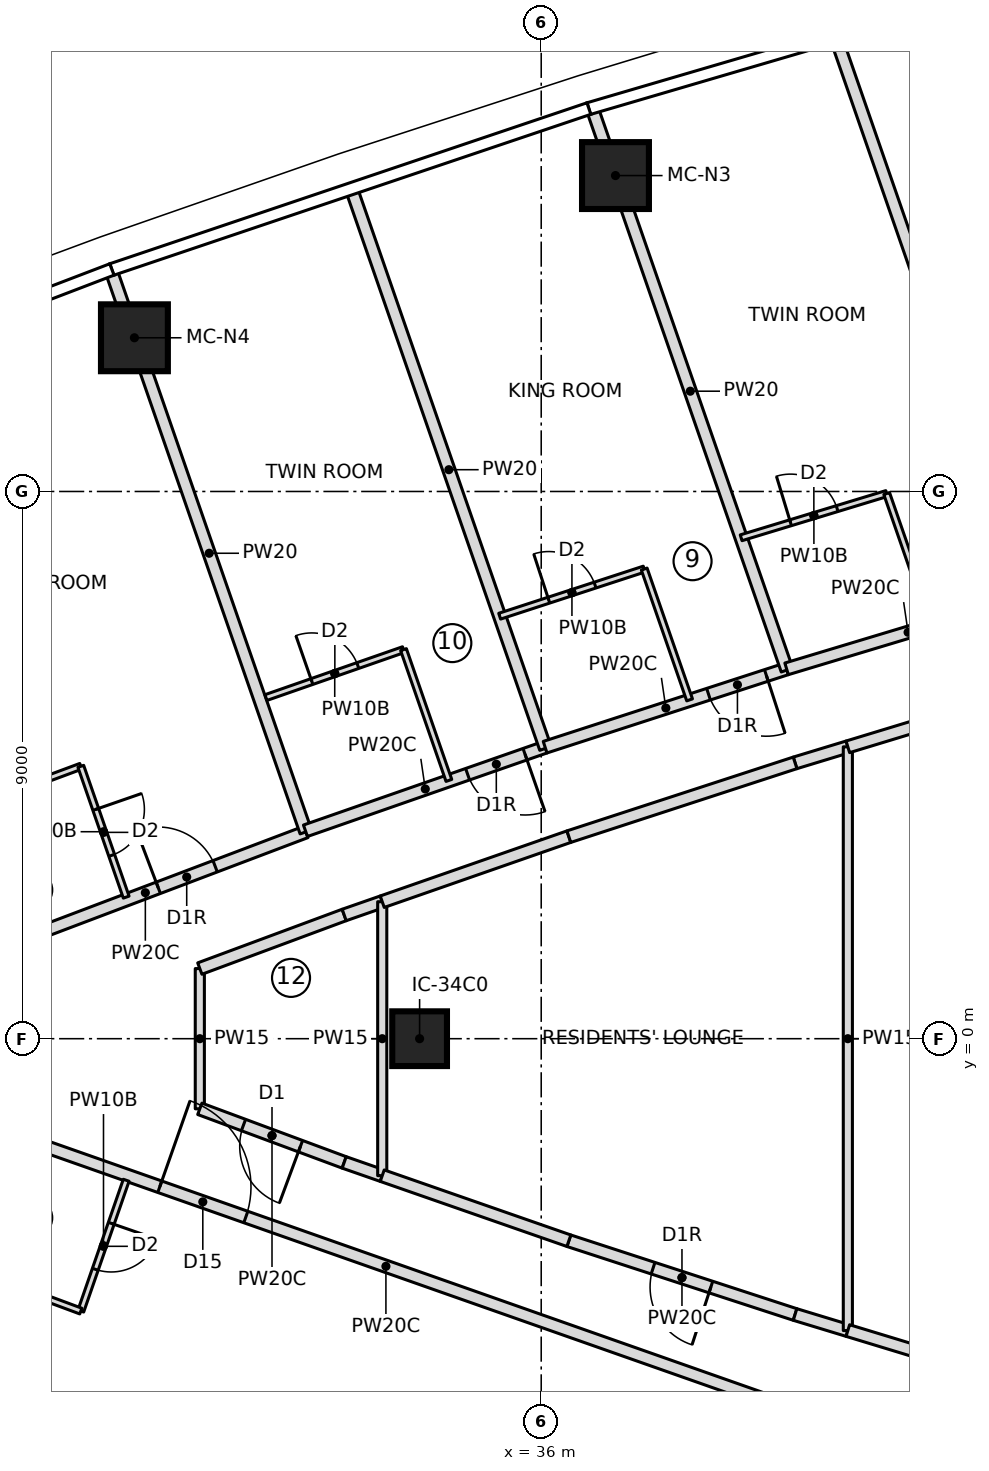
"""IFC4 building model, lengths in metres.
Left out: names, types, materials, properties, quantities, classifications, styles, units other than length and angle.
Written with IfcOpenShell. Run it as: python <this file> out.ifc"""

import sys

from ifc_helpers import new_model, si_unit, direction, frame, frame_2d, origin, origin_2d, place, context, subcontext, project, spatial, rectangle, extrude, element, fill, save


model = new_model("IFC4")
c1 = context("Model", 3, precision=1e-05, world=origin(), true_north=direction((0.0, 1.0)))
c2 = subcontext(c1, "Body", "Model", "MODEL_VIEW")
j1 = project(units=[si_unit("LENGTHUNIT", "METRE"), si_unit("PLANEANGLEUNIT", "RADIAN")], contexts=[c1])
p1 = place(None, origin())
s1 = spatial("IfcSite", under=j1, at=p1, CompositionType="ELEMENT")
p2 = place(p1, origin())
s2 = spatial("IfcBuilding", under=s1, at=p2, CompositionType="ELEMENT")
p3 = place(p2, frame((0.0, 0.0, 285.65)))
s3 = spatial("IfcBuildingStorey", under=s2, at=p3, CompositionType="ELEMENT", Elevation=285.65)
for number, where, z_axis, x_axis in (
    (1, (37.221, 14.196, 0.0), (0.0, 0.0, 1.0), (1.0, 0.0, 0.0)),
    (2, (29.31, 11.528, 0.0), (0.0, 0.0, 1.0), (1.0, 0.0, 0.0)),
):
    element("IfcColumn", number, at=place(p3, frame(where, z_axis=z_axis, x_axis=x_axis)), inside=s3, PredefinedType="COLUMN", context=c2, shape_type="SweptSolid", body=[
        extrude(rectangle(XDim=1.1, YDim=1.1, at=origin_2d()), origin(), (0.0, 0.0, 1.0), 3.55),
    ])
p4 = place(p3, frame((34.0, 0.0, 0.0), z_axis=(0.0, 0.0, 1.0), x_axis=(1.0, 0.0, 0.0)))
e3 = element("IfcColumn", 3, at=p4, inside=s3, PredefinedType="COLUMN", context=c2, shape_type="SweptSolid", body=[
    extrude(rectangle(XDim=0.9, YDim=0.9, at=origin_2d()), origin(), (0.0, 0.0, 1.0), 3.55),
])
p5 = place(p3, frame((26.85, 1.401, 0.0), z_axis=(0.0, 0.0, 1.0), x_axis=(0.935181367748, 0.354169181912, 0.0)))
e4 = element("IfcWall", 4, at=p5, inside=s3, PredefinedType="PARTITIONING", context=c2, shape_type="SweptSolid", body=[
    extrude(rectangle(XDim=5.645, YDim=0.2, at=frame_2d((2.823, 0.0))), origin(), (0.0, 0.0, 1.0), 3.25),
])
p6 = place(p5, frame((3.05, 0.0, 0.0)))
e5 = element("IfcOpeningElement", 5, at=p6, cuts=e4, PredefinedType="OPENING", context=c2, shape_type="SweptSolid", body=[
    extrude(rectangle(XDim=1.0, YDim=2.1, at=frame_2d((0.5, 1.05))), frame((0.0, 0.11, 0.0), z_axis=(0.0, -1.0, 0.0), x_axis=(1.0, 0.0, 0.0)), (0.0, 0.0, 1.0), 0.22),
])
p7 = place(p3, frame((27.733, 4.222, 0.0), z_axis=(0.0, 0.0, 1.0), x_axis=(0.937514267289, 0.347946833049, 0.0)))
e6 = element("IfcWall", 6, at=p7, inside=s3, PredefinedType="PARTITIONING", context=c2, shape_type="SweptSolid", body=[
    extrude(rectangle(XDim=0.742, YDim=0.1, at=frame_2d((0.371, 0.0))), origin(), (0.0, 0.0, 1.0), 3.25),
])
p8 = place(p3, frame((28.428, 4.48, 0.0), z_axis=(0.0, 0.0, 1.0), x_axis=(0.327718024288, -0.944775579996, 0.0)))
e7 = element("IfcWall", 7, at=p8, inside=s3, PredefinedType="PARTITIONING", context=c2, shape_type="SweptSolid", body=[
    extrude(rectangle(XDim=2.277, YDim=0.1, at=frame_2d((1.139, 0.0))), origin(), (0.0, 0.0, 1.0), 3.25),
])
p9 = place(p8, frame((0.75, 0.0, 0.0)))
e8 = element("IfcOpeningElement", 8, at=p9, cuts=e7, PredefinedType="OPENING", context=c2, shape_type="SweptSolid", body=[
    extrude(rectangle(XDim=0.8, YDim=2.1, at=frame_2d((0.4, 1.05))), frame((0.0, 0.06, 0.0), z_axis=(0.0, -1.0, 0.0), x_axis=(1.0, 0.0, 0.0)), (0.0, 0.0, 1.0), 0.12),
])
p10 = place(p3, frame((32.129, 3.401, 0.0), z_axis=(0.0, 0.0, 1.0), x_axis=(-0.327724115377, 0.944773467134, 0.0)))
e9 = element("IfcWall", 9, at=p10, inside=s3, PredefinedType="PARTITIONING", context=c2, shape_type="SweptSolid", body=[
    extrude(rectangle(XDim=9.702, YDim=0.2, at=frame_2d((4.851, 0.0))), origin(), (0.0, 0.0, 1.0), 3.25),
])
p11 = place(p3, frame((36.064, 4.794, 0.0), z_axis=(0.0, 0.0, 1.0), x_axis=(-0.944236129554, -0.329269086986, 0.0)))
e10 = element("IfcWall", 10, at=p11, inside=s3, PredefinedType="PARTITIONING", context=c2, shape_type="SweptSolid", body=[
    extrude(rectangle(XDim=4.174, YDim=0.2, at=frame_2d((2.087, 0.0))), origin(), (0.0, 0.0, 1.0), 3.25),
])
p12 = place(p11, frame((0.35, 0.0, 0.0)))
e11 = element("IfcOpeningElement", 11, at=p12, cuts=e10, PredefinedType="OPENING", context=c2, shape_type="SweptSolid", body=[
    extrude(rectangle(XDim=1.0, YDim=2.1, at=frame_2d((0.5, 1.05))), frame((0.0, 0.11, 0.0), z_axis=(0.0, -1.0, 0.0), x_axis=(1.0, 0.0, 0.0)), (0.0, 0.0, 1.0), 0.22),
])
p13 = place(p3, frame((31.473, 5.611, 0.0), z_axis=(0.0, 0.0, 1.0), x_axis=(0.944305532659, 0.329069994059, 0.0)))
e12 = element("IfcWall", 12, at=p13, inside=s3, PredefinedType="PARTITIONING", context=c2, shape_type="SweptSolid", body=[
    extrude(rectangle(XDim=2.396, YDim=0.1, at=frame_2d((1.198, 0.0))), origin(), (0.0, 0.0, 1.0), 3.25),
])
p14 = place(p13, frame((0.8, 0.0, 0.0)))
e13 = element("IfcOpeningElement", 13, at=p14, cuts=e12, PredefinedType="OPENING", context=c2, shape_type="SweptSolid", body=[
    extrude(rectangle(XDim=0.8, YDim=2.1, at=frame_2d((0.4, 1.05))), frame((0.0, 0.06, 0.0), z_axis=(0.0, -1.0, 0.0), x_axis=(1.0, 0.0, 0.0)), (0.0, 0.0, 1.0), 0.12),
])
p15 = place(p3, frame((33.735, 6.399, 0.0), z_axis=(0.0, 0.0, 1.0), x_axis=(0.32768871219, -0.944785747089, 0.0)))
e14 = element("IfcWall", 14, at=p15, inside=s3, PredefinedType="PARTITIONING", context=c2, shape_type="SweptSolid", body=[
    extrude(rectangle(XDim=2.277, YDim=0.1, at=frame_2d((1.138, 0.0))), origin(), (0.0, 0.0, 1.0), 3.25),
])
p16 = place(p3, frame((36.071, 4.775, 0.0), z_axis=(0.0, 0.0, 1.0), x_axis=(-0.327725028322, 0.94477315045, 0.0)))
e15 = element("IfcWall", 15, at=p16, inside=s3, PredefinedType="PARTITIONING", context=c2, shape_type="SweptSolid", body=[
    extrude(rectangle(XDim=9.702, YDim=0.2, at=frame_2d((4.851, 0.0))), origin(), (0.0, 0.0, 1.0), 3.25),
])
p17 = place(p3, frame((40.035, 6.083, 0.0), z_axis=(0.0, 0.0, 1.0), x_axis=(-0.951196378796, -0.308586209941, 0.0)))
e16 = element("IfcWall", 16, at=p17, inside=s3, PredefinedType="PARTITIONING", context=c2, shape_type="SweptSolid", body=[
    extrude(rectangle(XDim=4.175, YDim=0.2, at=frame_2d((2.087, 0.0))), origin(), (0.0, 0.0, 1.0), 3.25),
])
p18 = place(p17, frame((0.35, 0.0, 0.0)))
e17 = element("IfcOpeningElement", 17, at=p18, cuts=e16, PredefinedType="OPENING", context=c2, shape_type="SweptSolid", body=[
    extrude(rectangle(XDim=1.0, YDim=2.1, at=frame_2d((0.5, 1.05))), frame((0.0, 0.11, 0.0), z_axis=(0.0, -1.0, 0.0), x_axis=(1.0, 0.0, 0.0)), (0.0, 0.0, 1.0), 0.22),
])
p19 = place(p3, frame((35.317, 6.948, 0.0), z_axis=(0.0, 0.0, 1.0), x_axis=(0.950666002187, 0.310216299194, 0.0)))
e18 = element("IfcWall", 18, at=p19, inside=s3, PredefinedType="PARTITIONING", context=c2, shape_type="SweptSolid", body=[
    extrude(rectangle(XDim=2.5, YDim=0.1, at=frame_2d((1.25, 0.0))), origin(), (0.0, 0.0, 1.0), 3.25),
])
p20 = place(p19, frame((0.85, 0.0, 0.0)))
e19 = element("IfcOpeningElement", 19, at=p20, cuts=e18, PredefinedType="OPENING", context=c2, shape_type="SweptSolid", body=[
    extrude(rectangle(XDim=0.8, YDim=2.1, at=frame_2d((0.4, 1.05))), frame((0.0, 0.06, 0.0), z_axis=(0.0, -1.0, 0.0), x_axis=(1.0, 0.0, 0.0)), (0.0, 0.0, 1.0), 0.12),
])
p21 = place(p3, frame((37.694, 7.724, 0.0), z_axis=(0.0, 0.0, 1.0), x_axis=(0.327622330203, -0.944808768351, 0.0)))
e20 = element("IfcWall", 20, at=p21, inside=s3, PredefinedType="PARTITIONING", context=c2, shape_type="SweptSolid", body=[
    extrude(rectangle(XDim=2.277, YDim=0.1, at=frame_2d((1.139, 0.0))), origin(), (0.0, 0.0, 1.0), 3.25),
])
p22 = place(p3, frame((40.042, 6.064, 0.0), z_axis=(0.0, 0.0, 1.0), x_axis=(-0.327710853631, 0.944778067279, 0.0)))
e21 = element("IfcWall", 21, at=p22, inside=s3, PredefinedType="PARTITIONING", context=c2, shape_type="SweptSolid", body=[
    extrude(rectangle(XDim=9.707, YDim=0.2, at=frame_2d((4.854, 0.0))), origin(), (0.0, 0.0, 1.0), 3.25),
])
p23 = place(p3, frame((44.031, 7.286, 0.0), z_axis=(0.0, 0.0, 1.0), x_axis=(-0.957521424208, -0.288362137222, 0.0)))
e22 = element("IfcWall", 22, at=p23, inside=s3, PredefinedType="PARTITIONING", context=c2, shape_type="SweptSolid", body=[
    extrude(rectangle(XDim=4.173, YDim=0.2, at=frame_2d((2.086, 0.0))), origin(), (0.0, 0.0, 1.0), 3.25),
])
p24 = place(p23, frame((0.35, 0.0, 0.0)))
e23 = element("IfcOpeningElement", 23, at=p24, cuts=e22, PredefinedType="OPENING", context=c2, shape_type="SweptSolid", body=[
    extrude(rectangle(XDim=1.0, YDim=2.1, at=frame_2d((0.5, 1.05))), frame((0.0, 0.11, 0.0), z_axis=(0.0, -1.0, 0.0), x_axis=(1.0, 0.0, 0.0)), (0.0, 0.0, 1.0), 0.22),
])
p25 = place(p3, frame((39.288, 8.238, 0.0), z_axis=(0.0, 0.0, 1.0), x_axis=(0.956723503196, 0.290998519638, 0.0)))
e24 = element("IfcWall", 24, at=p25, inside=s3, PredefinedType="PARTITIONING", context=c2, shape_type="SweptSolid", body=[
    extrude(rectangle(XDim=2.502, YDim=0.1, at=frame_2d((1.251, 0.0))), origin(), (0.0, 0.0, 1.0), 3.25),
])
p26 = place(p25, frame((0.85, 0.0, 0.0)))
e25 = element("IfcOpeningElement", 25, at=p26, cuts=e24, PredefinedType="OPENING", context=c2, shape_type="SweptSolid", body=[
    extrude(rectangle(XDim=0.8, YDim=2.1, at=frame_2d((0.4, 1.05))), frame((0.0, 0.06, 0.0), z_axis=(0.0, -1.0, 0.0), x_axis=(1.0, 0.0, 0.0)), (0.0, 0.0, 1.0), 0.12),
])
p27 = place(p3, frame((41.681, 8.966, 0.0), z_axis=(0.0, 0.0, 1.0), x_axis=(0.327743427431, -0.944766767925, 0.0)))
e26 = element("IfcWall", 26, at=p27, inside=s3, PredefinedType="PARTITIONING", context=c2, shape_type="SweptSolid", body=[
    extrude(rectangle(XDim=2.279, YDim=0.1, at=frame_2d((1.139, 0.0))), origin(), (0.0, 0.0, 1.0), 3.25),
])
p28 = place(p3, frame((44.038, 7.267, 0.0), z_axis=(0.0, 0.0, 1.0), x_axis=(-0.327714576096, 0.944776776077, 0.0)))
e27 = element("IfcWall", 27, at=p28, inside=s3, PredefinedType="PARTITIONING", context=c2, shape_type="SweptSolid", body=[
    extrude(rectangle(XDim=9.717, YDim=0.2, at=frame_2d((4.858, 0.0))), origin(), (0.0, 0.0, 1.0), 3.25),
])
p29 = place(p3, frame((26.85, -1.423, 0.0), z_axis=(0.0, 0.0, 1.0), x_axis=(0.943328585164, -0.331860182022, 0.0)))
e28 = element("IfcWall", 28, at=p29, inside=s3, PredefinedType="PARTITIONING", context=c2, shape_type="SweptSolid", body=[
    extrude(rectangle(XDim=13.984, YDim=0.2, at=frame_2d((6.992, 0.0))), origin(), (0.0, 0.0, 1.0), 3.25),
])
p30 = place(p29, frame((3.05, 0.0, 0.0)))
e29 = element("IfcOpeningElement", 29, at=p30, cuts=e28, PredefinedType="OPENING", context=c2, shape_type="SweptSolid", body=[
    extrude(rectangle(XDim=1.5, YDim=2.1, at=frame_2d((0.75, 1.05))), frame((0.0, 0.11, 0.0), z_axis=(0.0, -1.0, 0.0), x_axis=(1.0, 0.0, 0.0)), (0.0, 0.0, 1.0), 0.22),
])
p31 = place(p3, frame((29.175, -2.328, 0.0), z_axis=(0.0, 0.0, 1.0), x_axis=(-0.327718024288, -0.944775579996, 0.0)))
e30 = element("IfcWall", 30, at=p31, inside=s3, PredefinedType="PARTITIONING", context=c2, shape_type="SweptSolid", body=[
    extrude(rectangle(XDim=2.277, YDim=0.1, at=frame_2d((1.139, 0.0))), origin(), (0.0, 0.0, 1.0), 3.25),
])
p32 = place(p31, frame((0.75, 0.0, 0.0)))
e31 = element("IfcOpeningElement", 31, at=p32, cuts=e30, PredefinedType="OPENING", context=c2, shape_type="SweptSolid", body=[
    extrude(rectangle(XDim=0.8, YDim=2.1, at=frame_2d((0.4, 1.05))), frame((0.0, 0.06, 0.0), z_axis=(0.0, -1.0, 0.0), x_axis=(1.0, 0.0, 0.0)), (0.0, 0.0, 1.0), 0.12),
])
p33 = place(p3, frame((28.428, -4.48, 0.0), z_axis=(0.0, 0.0, 1.0), x_axis=(-0.937514267289, 0.347946833049, 0.0)))
e32 = element("IfcWall", 32, at=p33, inside=s3, PredefinedType="PARTITIONING", context=c2, shape_type="SweptSolid", body=[
    extrude(rectangle(XDim=0.742, YDim=0.1, at=frame_2d((0.371, 0.0))), origin(), (0.0, 0.0, 1.0), 3.25),
])
p34 = place(p3, frame((30.385, -1.153, 0.0), z_axis=(0.0, 0.0, 1.0), x_axis=(0.0, 1.0, 0.0)))
e33 = element("IfcWall", 33, at=p34, inside=s3, PredefinedType="PARTITIONING", context=c2, shape_type="SweptSolid", body=[
    extrude(rectangle(XDim=2.307, YDim=0.15, at=frame_2d((1.153, 0.0))), origin(), (0.0, 0.0, 1.0), 3.25),
])
p35 = place(p3, frame((32.76, -2.035, 0.0), z_axis=(0.0, 0.0, 1.0), x_axis=(-0.937461225735, 0.348089715797, 0.0)))
e34 = element("IfcWall", 34, at=p35, inside=s3, PredefinedType="PARTITIONING", context=c2, shape_type="SweptSolid", body=[
    extrude(rectangle(XDim=2.533, YDim=0.2, at=frame_2d((1.266, 0.0))), origin(), (0.0, 0.0, 1.0), 3.25),
])
p36 = place(p35, frame((0.766, 0.0, 0.0)))
e35 = element("IfcOpeningElement", 35, at=p36, cuts=e34, PredefinedType="OPENING", context=c2, shape_type="SweptSolid", body=[
    extrude(rectangle(XDim=1.0, YDim=2.1, at=frame_2d((0.5, 1.05))), frame((0.0, 0.11, 0.0), z_axis=(0.0, -1.0, 0.0), x_axis=(1.0, 0.0, 0.0)), (0.0, 0.0, 1.0), 0.22),
])
p37 = place(p3, frame((30.385, 1.153, 0.0), z_axis=(0.0, 0.0, 1.0), x_axis=(0.937461225735, 0.348089715797, 0.0)))
e36 = element("IfcWall", 36, at=p37, inside=s3, PredefinedType="PARTITIONING", context=c2, shape_type="SweptSolid", body=[
    extrude(rectangle(XDim=2.533, YDim=0.2, at=frame_2d((1.266, 0.0))), origin(), (0.0, 0.0, 1.0), 3.25),
])
for number, where, z_axis, x_axis in (
    (37, (32.76, 2.035, 0.0), (0.0, 0.0, 1.0), (0.944, 0.329, 0.0)),
    (38, (33.385, -2.253, 0.0), (0.0, 0.0, 1.0), (-0.944, 0.329, 0.0)),
):
    element("IfcWall", number, at=place(p3, frame(where, z_axis=z_axis, x_axis=x_axis)), inside=s3, PredefinedType="PARTITIONING", context=c2, shape_type="SweptSolid", body=[
        extrude(rectangle(XDim=0.663, YDim=0.2, at=frame_2d((0.331, 0.0))), origin(), (0.0, 0.0, 1.0), 3.25),
    ])
p38 = place(p3, frame((33.385, -2.253, 0.0), z_axis=(0.0, 0.0, 1.0), x_axis=(0.0, 1.0, 0.0)))
e39 = element("IfcWall", 39, at=p38, inside=s3, PredefinedType="PARTITIONING", context=c2, shape_type="SweptSolid", body=[
    extrude(rectangle(XDim=4.506, YDim=0.15, at=frame_2d((2.253, 0.0))), origin(), (0.0, 0.0, 1.0), 3.25),
])
p39 = place(p3, frame((40.175, -4.536, 0.0), z_axis=(0.0, 0.0, 1.0), x_axis=(-0.950709849021, 0.310081897206, 0.0)))
e40 = element("IfcWall", 40, at=p39, inside=s3, PredefinedType="PARTITIONING", context=c2, shape_type="SweptSolid", body=[
    extrude(rectangle(XDim=3.913, YDim=0.2, at=frame_2d((1.957, 0.0))), origin(), (0.0, 0.0, 1.0), 3.25),
])
p40 = place(p39, frame((1.457, 0.0, 0.0)))
e41 = element("IfcOpeningElement", 41, at=p40, cuts=e40, PredefinedType="OPENING", context=c2, shape_type="SweptSolid", body=[
    extrude(rectangle(XDim=1.0, YDim=2.1, at=frame_2d((0.5, 1.05))), frame((0.0, 0.11, 0.0), z_axis=(0.0, -1.0, 0.0), x_axis=(1.0, 0.0, 0.0)), (0.0, 0.0, 1.0), 0.22),
])
for number, where, z_axis, x_axis in (
    (42, (40.175, 4.536, 0.0), (0.0, 0.0, 1.0), (0.957, 0.291, 0.0)),
    (43, (41.043, -4.8, 0.0), (0.0, 0.0, 1.0), (-0.957, 0.291, 0.0)),
):
    element("IfcWall", number, at=place(p3, frame(where, z_axis=z_axis, x_axis=x_axis)), inside=s3, PredefinedType="PARTITIONING", context=c2, shape_type="SweptSolid", body=[
        extrude(rectangle(XDim=0.907, YDim=0.2, at=frame_2d((0.454, 0.0))), origin(), (0.0, 0.0, 1.0), 3.25),
    ])
for number, where, z_axis, x_axis in (
    (44, (36.455, -3.323, 0.0), (0.0, 0.0, 1.0), (-0.944, 0.329, 0.0)),
    (45, (33.385, 2.253, 0.0), (0.0, 0.0, 1.0), (0.944, 0.329, 0.0)),
):
    element("IfcWall", number, at=place(p3, frame(where, z_axis=z_axis, x_axis=x_axis)), inside=s3, PredefinedType="PARTITIONING", context=c2, shape_type="SweptSolid", body=[
        extrude(rectangle(XDim=3.25, YDim=0.2, at=frame_2d((1.625, 0.0))), origin(), (0.0, 0.0, 1.0), 3.25),
    ])
p41 = place(p3, frame((36.455, 3.323, 0.0), z_axis=(0.0, 0.0, 1.0), x_axis=(0.950709849021, 0.310081897206, 0.0)))
e46 = element("IfcWall", 46, at=p41, inside=s3, PredefinedType="PARTITIONING", context=c2, shape_type="SweptSolid", body=[
    extrude(rectangle(XDim=3.913, YDim=0.2, at=frame_2d((1.957, 0.0))), origin(), (0.0, 0.0, 1.0), 3.25),
])
p42 = place(p3, frame((41.043, -4.8, 0.0), z_axis=(0.0, 0.0, 1.0), x_axis=(0.0, 1.0, 0.0)))
e47 = element("IfcWall", 47, at=p42, inside=s3, PredefinedType="PARTITIONING", context=c2, shape_type="SweptSolid", body=[
    extrude(rectangle(XDim=9.6, YDim=0.15, at=frame_2d((4.8, 0.0))), origin(), (0.0, 0.0, 1.0), 3.25),
])
for number, where, z_axis, x_axis in (
    (48, (43.918, -5.675, 0.0), (0.0, 0.0, 1.0), (-0.957, 0.291, 0.0)),
    (49, (41.043, 4.8, 0.0), (0.0, 0.0, 1.0), (0.957, 0.291, 0.0)),
):
    element("IfcWall", number, at=place(p3, frame(where, z_axis=z_axis, x_axis=x_axis)), inside=s3, PredefinedType="PARTITIONING", context=c2, shape_type="SweptSolid", body=[
        extrude(rectangle(XDim=3.006, YDim=0.2, at=frame_2d((1.503, 0.0))), origin(), (0.0, 0.0, 1.0), 3.25),
    ])
p43 = place(p9, origin())
e50 = element("IfcDoor", 50, at=p43, inside=s3, OperationType="SINGLE_SWING_LEFT", PredefinedType="DOOR", context=c2, shape_type="SweptSolid", body=[
    extrude(rectangle(XDim=0.8, YDim=2.1, at=frame_2d((0.4, 1.05))), frame((0.0, 0.025, 0.0), z_axis=(0.0, -1.0, 0.0), x_axis=(1.0, 0.0, 0.0)), (0.0, 0.0, 1.0), 0.05),
])
fill(e8, e50)
p44 = place(p6, origin())
e51 = element("IfcDoor", 51, at=p44, inside=s3, OperationType="SINGLE_SWING_RIGHT", PredefinedType="DOOR", context=c2, shape_type="SweptSolid", body=[
    extrude(rectangle(XDim=1.0, YDim=2.1, at=frame_2d((0.5, 1.05))), frame((0.0, 0.025, 0.0), z_axis=(0.0, -1.0, 0.0), x_axis=(1.0, 0.0, 0.0)), (0.0, 0.0, 1.0), 0.05),
])
fill(e5, e51)
p45 = place(p14, origin())
e52 = element("IfcDoor", 52, at=p45, inside=s3, OperationType="SINGLE_SWING_LEFT", PredefinedType="DOOR", context=c2, shape_type="SweptSolid", body=[
    extrude(rectangle(XDim=0.8, YDim=2.1, at=frame_2d((0.4, 1.05))), frame((0.0, 0.025, 0.0), z_axis=(0.0, -1.0, 0.0), x_axis=(1.0, 0.0, 0.0)), (0.0, 0.0, 1.0), 0.05),
])
fill(e13, e52)
p46 = place(p12, origin())
e53 = element("IfcDoor", 53, at=p46, inside=s3, OperationType="SINGLE_SWING_RIGHT", PredefinedType="DOOR", context=c2, shape_type="SweptSolid", body=[
    extrude(rectangle(XDim=1.0, YDim=2.1, at=frame_2d((0.5, 1.05))), frame((0.0, 0.025, 0.0), z_axis=(0.0, -1.0, 0.0), x_axis=(1.0, 0.0, 0.0)), (0.0, 0.0, 1.0), 0.05),
])
fill(e11, e53)
p47 = place(p20, origin())
e54 = element("IfcDoor", 54, at=p47, inside=s3, OperationType="SINGLE_SWING_LEFT", PredefinedType="DOOR", context=c2, shape_type="SweptSolid", body=[
    extrude(rectangle(XDim=0.8, YDim=2.1, at=frame_2d((0.4, 1.05))), frame((0.0, 0.025, 0.0), z_axis=(0.0, -1.0, 0.0), x_axis=(1.0, 0.0, 0.0)), (0.0, 0.0, 1.0), 0.05),
])
fill(e19, e54)
p48 = place(p18, origin())
e55 = element("IfcDoor", 55, at=p48, inside=s3, OperationType="SINGLE_SWING_RIGHT", PredefinedType="DOOR", context=c2, shape_type="SweptSolid", body=[
    extrude(rectangle(XDim=1.0, YDim=2.1, at=frame_2d((0.5, 1.05))), frame((0.0, 0.025, 0.0), z_axis=(0.0, -1.0, 0.0), x_axis=(1.0, 0.0, 0.0)), (0.0, 0.0, 1.0), 0.05),
])
fill(e17, e55)
p49 = place(p26, origin())
e56 = element("IfcDoor", 56, at=p49, inside=s3, OperationType="SINGLE_SWING_LEFT", PredefinedType="DOOR", context=c2, shape_type="SweptSolid", body=[
    extrude(rectangle(XDim=0.8, YDim=2.1, at=frame_2d((0.4, 1.05))), frame((0.0, 0.025, 0.0), z_axis=(0.0, -1.0, 0.0), x_axis=(1.0, 0.0, 0.0)), (0.0, 0.0, 1.0), 0.05),
])
fill(e25, e56)
p50 = place(p32, origin())
e57 = element("IfcDoor", 57, at=p50, inside=s3, OperationType="SINGLE_SWING_LEFT", PredefinedType="DOOR", context=c2, shape_type="SweptSolid", body=[
    extrude(rectangle(XDim=0.8, YDim=2.1, at=frame_2d((0.4, 1.05))), frame((0.0, 0.025, 0.0), z_axis=(0.0, -1.0, 0.0), x_axis=(1.0, 0.0, 0.0)), (0.0, 0.0, 1.0), 0.05),
])
fill(e31, e57)
p51 = place(p30, origin())
e58 = element("IfcDoor", 58, at=p51, inside=s3, OperationType="DOUBLE_DOOR_SINGLE_SWING", PredefinedType="DOOR", context=c2, shape_type="SweptSolid", body=[
    extrude(rectangle(XDim=1.5, YDim=2.1, at=frame_2d((0.75, 1.05))), frame((0.0, 0.025, 0.0), z_axis=(0.0, -1.0, 0.0), x_axis=(1.0, 0.0, 0.0)), (0.0, 0.0, 1.0), 0.05),
])
fill(e29, e58)
p52 = place(p36, origin())
e59 = element("IfcDoor", 59, at=p52, inside=s3, OperationType="SINGLE_SWING_LEFT", PredefinedType="DOOR", context=c2, shape_type="SweptSolid", body=[
    extrude(rectangle(XDim=1.0, YDim=2.1, at=frame_2d((0.5, 1.05))), frame((0.0, 0.025, 0.0), z_axis=(0.0, -1.0, 0.0), x_axis=(1.0, 0.0, 0.0)), (0.0, 0.0, 1.0), 0.05),
])
fill(e35, e59)
p53 = place(p40, origin())
e60 = element("IfcDoor", 60, at=p53, inside=s3, OperationType="SINGLE_SWING_RIGHT", PredefinedType="DOOR", context=c2, shape_type="SweptSolid", body=[
    extrude(rectangle(XDim=1.0, YDim=2.1, at=frame_2d((0.5, 1.05))), frame((0.0, 0.025, 0.0), z_axis=(0.0, -1.0, 0.0), x_axis=(1.0, 0.0, 0.0)), (0.0, 0.0, 1.0), 0.05),
])
fill(e41, e60)
save(model, sys.argv[1])
